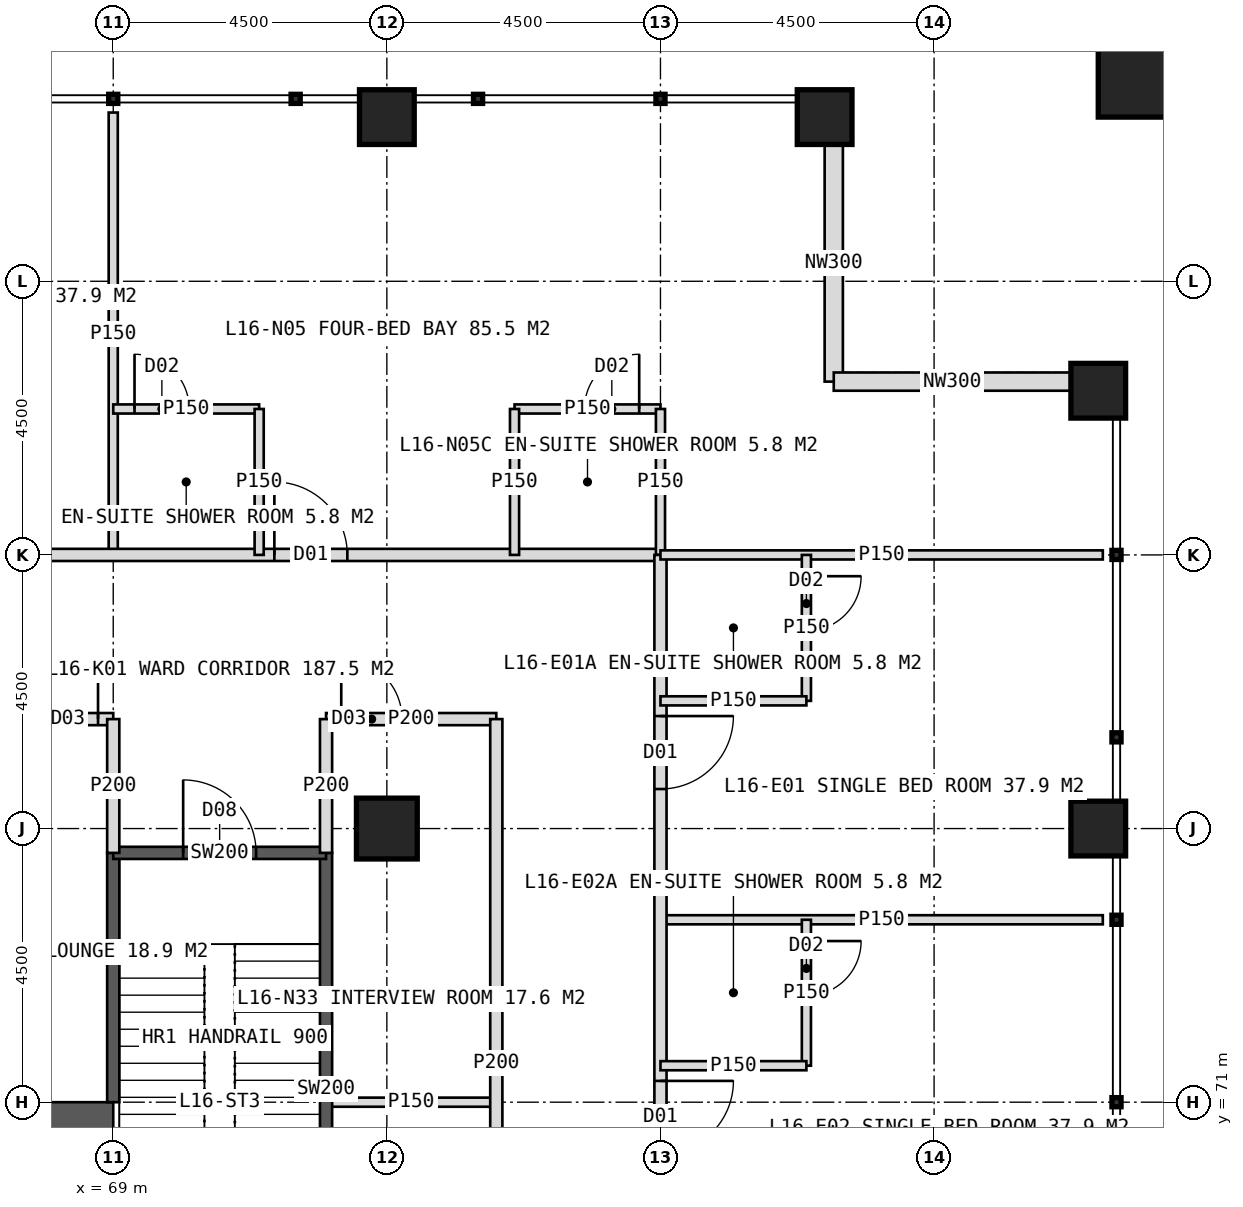
"""IFC4 building model, lengths in metres.
Left out: names, types, materials, properties, quantities, classifications, styles, units other than length and angle.
Written with IfcOpenShell. Run it as: python <this file> out.ifc"""

import sys

from ifc_helpers import new_model, si_unit, direction, frame, frame_2d, origin, origin_2d, place, context, subcontext, project, spatial, rectangle, hollow_rectangle, extrude, element, fill, save


model = new_model("IFC4")
c1 = context("Model", 3, precision=1e-05, world=origin(), true_north=direction((0.0, 1.0)))
c2 = subcontext(c1, "Body", "Model", "MODEL_VIEW")
j1 = project(units=[si_unit("LENGTHUNIT", "METRE"), si_unit("PLANEANGLEUNIT", "RADIAN")], contexts=[c1])
p1 = place(None, origin())
s1 = spatial("IfcSite", under=j1, at=p1, CompositionType="ELEMENT")
p2 = place(p1, origin())
s2 = spatial("IfcBuilding", under=s1, at=p2, CompositionType="ELEMENT")
p3 = place(p2, frame((0.0, 0.0, 71.0)))
s3 = spatial("IfcBuildingStorey", under=s2, at=p3, CompositionType="ELEMENT", Elevation=71.0)
p4 = place(p3, frame((51.0, 70.75, 0.0), z_axis=(0.0, 0.0, 1.0), x_axis=(1.0, 0.0, 0.0)))
e1 = element("IfcWall", 1, at=p4, inside=s3, PredefinedType="SHEAR", context=c2, shape_type="SweptSolid", body=[
    extrude(rectangle(XDim=18.0, YDim=0.5, at=frame_2d((9.0, 0.0))), origin(), (0.0, 0.0, 1.0), 4.0),
])
p5 = place(p4, frame((8.1, 0.0, 0.0)))
e2 = element("IfcOpeningElement", 2, at=p5, cuts=e1, PredefinedType="OPENING", context=c2, shape_type="SweptSolid", body=[
    extrude(rectangle(XDim=1.8, YDim=2.2, at=frame_2d((0.9, 1.1))), frame((0.0, 0.26, 0.0), z_axis=(0.0, -1.0, 0.0), x_axis=(1.0, 0.0, 0.0)), (0.0, 0.0, 1.0), 0.52),
])
p6 = place(p3, frame((73.5, 75.5, 0.0), z_axis=(0.0, 0.0, 1.0), x_axis=(1.0, 0.0, 0.0)))
e3 = element("IfcColumn", 3, at=p6, inside=s3, PredefinedType="COLUMN", context=c2, shape_type="SweptSolid", body=[
    extrude(hollow_rectangle(XDim=1.0, YDim=1.0, WallThickness=0.1, at=origin_2d()), origin(), (0.0, 0.0, 1.0), 4.0),
])
for number, where, z_axis, x_axis in (
    (4, (73.5, 87.2, 0.0), (0.0, 0.0, 1.0), (1.0, 0.0, 0.0)),
    (5, (85.2, 75.5, 0.0), (0.0, 0.0, 1.0), (1.0, 0.0, 0.0)),
    (6, (80.7, 87.2, 0.0), (0.0, 0.0, 1.0), (1.0, 0.0, 0.0)),
    (7, (85.2, 82.7, 0.0), (0.0, 0.0, 1.0), (1.0, 0.0, 0.0)),
):
    element("IfcColumn", number, at=place(p3, frame(where, z_axis=z_axis, x_axis=x_axis)), inside=s3, PredefinedType="COLUMN", context=c2, shape_type="SweptSolid", body=[
        extrude(hollow_rectangle(XDim=0.9, YDim=0.9, WallThickness=0.08, at=origin_2d()), origin(), (0.0, 0.0, 1.0), 4.0),
    ])
p7 = place(p3, frame((86.1, 88.1, 0.0), z_axis=(0.0, 0.0, 1.0), x_axis=(1.0, 0.0, 0.0)))
e8 = element("IfcColumn", 8, at=p7, inside=s3, PredefinedType="COLUMN", context=c2, shape_type="SweptSolid", body=[
    extrude(hollow_rectangle(XDim=1.8, YDim=1.8, WallThickness=0.1, at=origin_2d()), origin(), (0.0, 0.0, 1.0), 4.0),
])
for number, where, z_axis, x_axis in (
    (9, (80.85, 86.75, 0.0), (0.0, 0.0, 1.0), (0.0, -1.0, 0.0)),
    (10, (80.85, 82.85, 0.0), (0.0, 0.0, 1.0), (1.0, 0.0, 0.0)),
):
    element("IfcWall", number, at=place(p3, frame(where, z_axis=z_axis, x_axis=x_axis)), inside=s3, PredefinedType="ELEMENTEDWALL", context=c2, shape_type="SweptSolid", body=[
        extrude(rectangle(XDim=3.9, YDim=0.3, at=frame_2d((1.95, 0.0))), origin(), (0.0, 0.0, 1.0), 2.95),
    ])
p8 = place(p3, frame((69.0, 80.0, 0.0), z_axis=(0.0, 0.0, 1.0), x_axis=(0.0, 1.0, 0.0)))
e11 = element("IfcWall", 11, at=p8, inside=s3, PredefinedType="PARTITIONING", context=c2, shape_type="SweptSolid", body=[
    extrude(rectangle(XDim=7.275, YDim=0.15, at=frame_2d((3.637, 0.0))), origin(), (0.0, 0.0, 1.0), 3.75),
])
p9 = place(p3, frame((42.0, 80.0, 0.0), z_axis=(0.0, 0.0, 1.0), x_axis=(1.0, 0.0, 0.0)))
e12 = element("IfcWall", 12, at=p9, inside=s3, PredefinedType="PARTITIONING", context=c2, shape_type="SweptSolid", body=[
    extrude(rectangle(XDim=36.0, YDim=0.2, at=frame_2d((18.0, 0.0))), origin(), (0.0, 0.0, 1.0), 3.75),
])
p10 = place(p9, frame((3.9, 0.0, 0.0)))
e13 = element("IfcOpeningElement", 13, at=p10, cuts=e12, PredefinedType="OPENING", context=c2, shape_type="SweptSolid", body=[
    extrude(rectangle(XDim=1.2, YDim=2.2, at=frame_2d((0.6, 1.1))), frame((0.0, 0.11, 0.0), z_axis=(0.0, -1.0, 0.0), x_axis=(1.0, 0.0, 0.0)), (0.0, 0.0, 1.0), 0.22),
])
p11 = place(p9, frame((11.65, 0.0, 0.0)))
e14 = element("IfcOpeningElement", 14, at=p11, cuts=e12, PredefinedType="OPENING", context=c2, shape_type="SweptSolid", body=[
    extrude(rectangle(XDim=1.2, YDim=2.2, at=frame_2d((0.6, 1.1))), frame((0.0, 0.11, 0.0), z_axis=(0.0, -1.0, 0.0), x_axis=(1.0, 0.0, 0.0)), (0.0, 0.0, 1.0), 0.22),
])
p12 = place(p9, frame((17.65, 0.0, 0.0)))
e15 = element("IfcOpeningElement", 15, at=p12, cuts=e12, PredefinedType="OPENING", context=c2, shape_type="SweptSolid", body=[
    extrude(rectangle(XDim=1.2, YDim=2.2, at=frame_2d((0.6, 1.1))), frame((0.0, 0.11, 0.0), z_axis=(0.0, -1.0, 0.0), x_axis=(1.0, 0.0, 0.0)), (0.0, 0.0, 1.0), 0.22),
])
p13 = place(p9, frame((23.65, 0.0, 0.0)))
e16 = element("IfcOpeningElement", 16, at=p13, cuts=e12, PredefinedType="OPENING", context=c2, shape_type="SweptSolid", body=[
    extrude(rectangle(XDim=1.2, YDim=2.2, at=frame_2d((0.6, 1.1))), frame((0.0, 0.11, 0.0), z_axis=(0.0, -1.0, 0.0), x_axis=(1.0, 0.0, 0.0)), (0.0, 0.0, 1.0), 0.22),
])
p14 = place(p9, frame((29.65, 0.0, 0.0)))
e17 = element("IfcOpeningElement", 17, at=p14, cuts=e12, PredefinedType="OPENING", context=c2, shape_type="SweptSolid", body=[
    extrude(rectangle(XDim=1.2, YDim=2.2, at=frame_2d((0.6, 1.1))), frame((0.0, 0.11, 0.0), z_axis=(0.0, -1.0, 0.0), x_axis=(1.0, 0.0, 0.0)), (0.0, 0.0, 1.0), 0.22),
])
p15 = place(p3, frame((69.0, 82.4, 0.0), z_axis=(0.0, 0.0, 1.0), x_axis=(1.0, 0.0, 0.0)))
e18 = element("IfcWall", 18, at=p15, inside=s3, PredefinedType="PARTITIONING", context=c2, shape_type="SweptSolid", body=[
    extrude(rectangle(XDim=2.4, YDim=0.15, at=frame_2d((1.2, 0.0))), origin(), (0.0, 0.0, 1.0), 3.75),
])
p16 = place(p15, frame((0.35, 0.0, 0.0)))
e19 = element("IfcOpeningElement", 19, at=p16, cuts=e18, PredefinedType="OPENING", context=c2, shape_type="SweptSolid", body=[
    extrude(rectangle(XDim=0.9, YDim=2.1, at=frame_2d((0.45, 1.05))), frame((0.0, 0.085, 0.0), z_axis=(0.0, -1.0, 0.0), x_axis=(1.0, 0.0, 0.0)), (0.0, 0.0, 1.0), 0.17),
])
p17 = place(p3, frame((71.4, 80.0, 0.0), z_axis=(0.0, 0.0, 1.0), x_axis=(0.0, 1.0, 0.0)))
e20 = element("IfcWall", 20, at=p17, inside=s3, PredefinedType="PARTITIONING", context=c2, shape_type="SweptSolid", body=[
    extrude(rectangle(XDim=2.4, YDim=0.15, at=frame_2d((1.2, 0.0))), origin(), (0.0, 0.0, 1.0), 3.75),
])
p18 = place(p3, frame((75.6, 82.4, 0.0), z_axis=(0.0, 0.0, 1.0), x_axis=(1.0, 0.0, 0.0)))
e21 = element("IfcWall", 21, at=p18, inside=s3, PredefinedType="PARTITIONING", context=c2, shape_type="SweptSolid", body=[
    extrude(rectangle(XDim=2.4, YDim=0.15, at=frame_2d((1.2, 0.0))), origin(), (0.0, 0.0, 1.0), 3.75),
])
p19 = place(p18, frame((1.15, 0.0, 0.0)))
e22 = element("IfcOpeningElement", 22, at=p19, cuts=e21, PredefinedType="OPENING", context=c2, shape_type="SweptSolid", body=[
    extrude(rectangle(XDim=0.9, YDim=2.1, at=frame_2d((0.45, 1.05))), frame((0.0, 0.085, 0.0), z_axis=(0.0, -1.0, 0.0), x_axis=(1.0, 0.0, 0.0)), (0.0, 0.0, 1.0), 0.17),
])
for number, where, z_axis, x_axis in (
    (23, (75.6, 80.0, 0.0), (0.0, 0.0, 1.0), (0.0, 1.0, 0.0)),
    (24, (78.0, 80.0, 0.0), (0.0, 0.0, 1.0), (0.0, 1.0, 0.0)),
):
    element("IfcWall", number, at=place(p3, frame(where, z_axis=z_axis, x_axis=x_axis)), inside=s3, PredefinedType="PARTITIONING", context=c2, shape_type="SweptSolid", body=[
        extrude(rectangle(XDim=2.4, YDim=0.15, at=frame_2d((1.2, 0.0))), origin(), (0.0, 0.0, 1.0), 3.75),
    ])
p20 = place(p3, frame((62.25, 77.3, 0.0), z_axis=(0.0, 0.0, 1.0), x_axis=(1.0, 0.0, 0.0)))
e25 = element("IfcWall", 25, at=p20, inside=s3, PredefinedType="PARTITIONING", context=c2, shape_type="SweptSolid", body=[
    extrude(rectangle(XDim=6.75, YDim=0.2, at=frame_2d((3.375, 0.0))), origin(), (0.0, 0.0, 1.0), 3.75),
])
p21 = place(p20, frame((1.375, 0.0, 0.0)))
e26 = element("IfcOpeningElement", 26, at=p21, cuts=e25, PredefinedType="OPENING", context=c2, shape_type="SweptSolid", body=[
    extrude(rectangle(XDim=1.0, YDim=2.1, at=frame_2d((0.5, 1.05))), frame((0.0, 0.11, 0.0), z_axis=(0.0, -1.0, 0.0), x_axis=(1.0, 0.0, 0.0)), (0.0, 0.0, 1.0), 0.22),
])
p22 = place(p20, frame((5.5, 0.0, 0.0)))
e27 = element("IfcOpeningElement", 27, at=p22, cuts=e25, PredefinedType="OPENING", context=c2, shape_type="SweptSolid", body=[
    extrude(rectangle(XDim=1.0, YDim=2.1, at=frame_2d((0.5, 1.05))), frame((0.0, 0.11, 0.0), z_axis=(0.0, -1.0, 0.0), x_axis=(1.0, 0.0, 0.0)), (0.0, 0.0, 1.0), 0.22),
])
p23 = place(p3, frame((72.5, 77.3, 0.0), z_axis=(0.0, 0.0, 1.0), x_axis=(1.0, 0.0, 0.0)))
e28 = element("IfcWall", 28, at=p23, inside=s3, PredefinedType="PARTITIONING", context=c2, shape_type="SweptSolid", body=[
    extrude(rectangle(XDim=2.8, YDim=0.2, at=frame_2d((1.4, 0.0))), origin(), (0.0, 0.0, 1.0), 3.75),
])
p24 = place(p23, frame((0.25, 0.0, 0.0)))
e29 = element("IfcOpeningElement", 29, at=p24, cuts=e28, PredefinedType="OPENING", context=c2, shape_type="SweptSolid", body=[
    extrude(rectangle(XDim=1.0, YDim=2.1, at=frame_2d((0.5, 1.05))), frame((0.0, 0.11, 0.0), z_axis=(0.0, -1.0, 0.0), x_axis=(1.0, 0.0, 0.0)), (0.0, 0.0, 1.0), 0.22),
])
p25 = place(p3, frame((78.0, 74.0, 0.0), z_axis=(0.0, 0.0, 1.0), x_axis=(1.0, 0.0, 0.0)))
e30 = element("IfcWall", 30, at=p25, inside=s3, PredefinedType="PARTITIONING", context=c2, shape_type="SweptSolid", body=[
    extrude(rectangle(XDim=7.275, YDim=0.15, at=frame_2d((3.637, 0.0))), origin(), (0.0, 0.0, 1.0), 3.75),
])
p26 = place(p3, frame((78.0, 80.0, 0.0), z_axis=(0.0, 0.0, 1.0), x_axis=(0.0, -1.0, 0.0)))
e31 = element("IfcWall", 31, at=p26, inside=s3, PredefinedType="PARTITIONING", context=c2, shape_type="SweptSolid", body=[
    extrude(rectangle(XDim=36.0, YDim=0.2, at=frame_2d((18.0, 0.0))), origin(), (0.0, 0.0, 1.0), 3.75),
])
p27 = place(p26, frame((2.65, 0.0, 0.0)))
e32 = element("IfcOpeningElement", 32, at=p27, cuts=e31, PredefinedType="OPENING", context=c2, shape_type="SweptSolid", body=[
    extrude(rectangle(XDim=1.2, YDim=2.2, at=frame_2d((0.6, 1.1))), frame((0.0, 0.11, 0.0), z_axis=(0.0, -1.0, 0.0), x_axis=(1.0, 0.0, 0.0)), (0.0, 0.0, 1.0), 0.22),
])
p28 = place(p26, frame((8.65, 0.0, 0.0)))
e33 = element("IfcOpeningElement", 33, at=p28, cuts=e31, PredefinedType="OPENING", context=c2, shape_type="SweptSolid", body=[
    extrude(rectangle(XDim=1.2, YDim=2.2, at=frame_2d((0.6, 1.1))), frame((0.0, 0.11, 0.0), z_axis=(0.0, -1.0, 0.0), x_axis=(1.0, 0.0, 0.0)), (0.0, 0.0, 1.0), 0.22),
])
p29 = place(p26, frame((14.65, 0.0, 0.0)))
e34 = element("IfcOpeningElement", 34, at=p29, cuts=e31, PredefinedType="OPENING", context=c2, shape_type="SweptSolid", body=[
    extrude(rectangle(XDim=1.2, YDim=2.2, at=frame_2d((0.6, 1.1))), frame((0.0, 0.11, 0.0), z_axis=(0.0, -1.0, 0.0), x_axis=(1.0, 0.0, 0.0)), (0.0, 0.0, 1.0), 0.22),
])
p30 = place(p26, frame((21.25, 0.0, 0.0)))
e35 = element("IfcOpeningElement", 35, at=p30, cuts=e31, PredefinedType="OPENING", context=c2, shape_type="SweptSolid", body=[
    extrude(rectangle(XDim=1.2, YDim=2.2, at=frame_2d((0.6, 1.1))), frame((0.0, 0.11, 0.0), z_axis=(0.0, -1.0, 0.0), x_axis=(1.0, 0.0, 0.0)), (0.0, 0.0, 1.0), 0.22),
])
p31 = place(p26, frame((29.65, 0.0, 0.0)))
e36 = element("IfcOpeningElement", 36, at=p31, cuts=e31, PredefinedType="OPENING", context=c2, shape_type="SweptSolid", body=[
    extrude(rectangle(XDim=1.2, YDim=2.2, at=frame_2d((0.6, 1.1))), frame((0.0, 0.11, 0.0), z_axis=(0.0, -1.0, 0.0), x_axis=(1.0, 0.0, 0.0)), (0.0, 0.0, 1.0), 0.22),
])
p32 = place(p3, frame((78.0, 80.0, 0.0), z_axis=(0.0, 0.0, 1.0), x_axis=(1.0, 0.0, 0.0)))
e37 = element("IfcWall", 37, at=p32, inside=s3, PredefinedType="PARTITIONING", context=c2, shape_type="SweptSolid", body=[
    extrude(rectangle(XDim=7.275, YDim=0.15, at=frame_2d((3.637, 0.0))), origin(), (0.0, 0.0, 1.0), 3.75),
])
p33 = place(p3, frame((80.4, 80.0, 0.0), z_axis=(0.0, 0.0, 1.0), x_axis=(0.0, -1.0, 0.0)))
e38 = element("IfcWall", 38, at=p33, inside=s3, PredefinedType="PARTITIONING", context=c2, shape_type="SweptSolid", body=[
    extrude(rectangle(XDim=2.4, YDim=0.15, at=frame_2d((1.2, 0.0))), origin(), (0.0, 0.0, 1.0), 3.75),
])
p34 = place(p33, frame((0.35, 0.0, 0.0)))
e39 = element("IfcOpeningElement", 39, at=p34, cuts=e38, PredefinedType="OPENING", context=c2, shape_type="SweptSolid", body=[
    extrude(rectangle(XDim=0.9, YDim=2.1, at=frame_2d((0.45, 1.05))), frame((0.0, 0.085, 0.0), z_axis=(0.0, -1.0, 0.0), x_axis=(1.0, 0.0, 0.0)), (0.0, 0.0, 1.0), 0.17),
])
p35 = place(p3, frame((78.0, 77.6, 0.0), z_axis=(0.0, 0.0, 1.0), x_axis=(1.0, 0.0, 0.0)))
e40 = element("IfcWall", 40, at=p35, inside=s3, PredefinedType="PARTITIONING", context=c2, shape_type="SweptSolid", body=[
    extrude(rectangle(XDim=2.4, YDim=0.15, at=frame_2d((1.2, 0.0))), origin(), (0.0, 0.0, 1.0), 3.75),
])
p36 = place(p3, frame((80.4, 74.0, 0.0), z_axis=(0.0, 0.0, 1.0), x_axis=(0.0, -1.0, 0.0)))
e41 = element("IfcWall", 41, at=p36, inside=s3, PredefinedType="PARTITIONING", context=c2, shape_type="SweptSolid", body=[
    extrude(rectangle(XDim=2.4, YDim=0.15, at=frame_2d((1.2, 0.0))), origin(), (0.0, 0.0, 1.0), 3.75),
])
p37 = place(p36, frame((0.35, 0.0, 0.0)))
e42 = element("IfcOpeningElement", 42, at=p37, cuts=e41, PredefinedType="OPENING", context=c2, shape_type="SweptSolid", body=[
    extrude(rectangle(XDim=0.9, YDim=2.1, at=frame_2d((0.45, 1.05))), frame((0.0, 0.085, 0.0), z_axis=(0.0, -1.0, 0.0), x_axis=(1.0, 0.0, 0.0)), (0.0, 0.0, 1.0), 0.17),
])
p38 = place(p3, frame((78.0, 71.6, 0.0), z_axis=(0.0, 0.0, 1.0), x_axis=(1.0, 0.0, 0.0)))
e43 = element("IfcWall", 43, at=p38, inside=s3, PredefinedType="PARTITIONING", context=c2, shape_type="SweptSolid", body=[
    extrude(rectangle(XDim=2.4, YDim=0.15, at=frame_2d((1.2, 0.0))), origin(), (0.0, 0.0, 1.0), 3.75),
])
p39 = place(p3, frame((72.5, 71.0, 0.0), z_axis=(0.0, 0.0, 1.0), x_axis=(1.0, 0.0, 0.0)))
e44 = element("IfcWall", 44, at=p39, inside=s3, PredefinedType="PARTITIONING", context=c2, shape_type="SweptSolid", body=[
    extrude(rectangle(XDim=2.8, YDim=0.15, at=frame_2d((1.4, 0.0))), origin(), (0.0, 0.0, 1.0), 3.75),
])
p40 = place(p3, frame((75.3, 77.3, 0.0), z_axis=(0.0, 0.0, 1.0), x_axis=(0.0, -1.0, 0.0)))
e45 = element("IfcWall", 45, at=p40, inside=s3, PredefinedType="PARTITIONING", context=c2, shape_type="SweptSolid", body=[
    extrude(rectangle(XDim=11.3, YDim=0.2, at=frame_2d((5.65, 0.0))), origin(), (0.0, 0.0, 1.0), 3.75),
])
p41 = place(p40, frame((8.3, 0.0, 0.0)))
e46 = element("IfcOpeningElement", 46, at=p41, cuts=e45, PredefinedType="OPENING", context=c2, shape_type="SweptSolid", body=[
    extrude(rectangle(XDim=1.0, YDim=2.1, at=frame_2d((0.5, 1.05))), frame((0.0, 0.11, 0.0), z_axis=(0.0, -1.0, 0.0), x_axis=(1.0, 0.0, 0.0)), (0.0, 0.0, 1.0), 0.22),
])
p42 = place(p3, frame((69.0, 71.0, 0.0), z_axis=(0.0, 0.0, 1.0), x_axis=(0.0, 1.0, 0.0)))
e47 = element("IfcWall", 47, at=p42, inside=s3, PredefinedType="SOLIDWALL", context=c2, shape_type="SweptSolid", body=[
    extrude(rectangle(XDim=4.1, YDim=0.2, at=frame_2d((2.05, 0.0))), origin(), (0.0, 0.0, 1.0), 3.75),
])
p43 = place(p3, frame((72.5, 67.35, 0.0), z_axis=(0.0, 0.0, 1.0), x_axis=(0.0, 1.0, 0.0)))
e48 = element("IfcWall", 48, at=p43, inside=s3, PredefinedType="SOLIDWALL", context=c2, shape_type="SweptSolid", body=[
    extrude(rectangle(XDim=7.75, YDim=0.2, at=frame_2d((3.875, 0.0))), origin(), (0.0, 0.0, 1.0), 3.75),
])
p44 = place(p3, frame((69.0, 75.1, 0.0), z_axis=(0.0, 0.0, 1.0), x_axis=(1.0, 0.0, 0.0)))
e49 = element("IfcWall", 49, at=p44, inside=s3, PredefinedType="SOLIDWALL", context=c2, shape_type="SweptSolid", body=[
    extrude(rectangle(XDim=3.5, YDim=0.2, at=frame_2d((1.75, 0.0))), origin(), (0.0, 0.0, 1.0), 3.75),
])
p45 = place(p44, frame((1.15, 0.0, 0.0)))
e50 = element("IfcOpeningElement", 50, at=p45, cuts=e49, PredefinedType="OPENING", context=c2, shape_type="SweptSolid", body=[
    extrude(rectangle(XDim=1.2, YDim=2.1, at=frame_2d((0.6, 1.05))), frame((0.0, 0.11, 0.0), z_axis=(0.0, -1.0, 0.0), x_axis=(1.0, 0.0, 0.0)), (0.0, 0.0, 1.0), 0.22),
])
for number, where, z_axis, x_axis in (
    (51, (69.0, 75.1, 0.0), (0.0, 0.0, 1.0), (0.0, 1.0, 0.0)),
    (52, (72.5, 75.1, 0.0), (0.0, 0.0, 1.0), (0.0, 1.0, 0.0)),
):
    element("IfcWall", number, at=place(p3, frame(where, z_axis=z_axis, x_axis=x_axis)), inside=s3, PredefinedType="PARTITIONING", context=c2, shape_type="SweptSolid", body=[
        extrude(rectangle(XDim=2.2, YDim=0.2, at=frame_2d((1.1, 0.0))), origin(), (0.0, 0.0, 1.0), 3.75),
    ])
p46 = place(p14, origin())
e53 = element("IfcDoor", 53, at=p46, inside=s3, OperationType="SINGLE_SWING_LEFT", PredefinedType="DOOR", context=c2, shape_type="SweptSolid", body=[
    extrude(rectangle(XDim=1.2, YDim=2.2, at=frame_2d((0.6, 1.1))), frame((0.0, 0.025, 0.0), z_axis=(0.0, -1.0, 0.0), x_axis=(1.0, 0.0, 0.0)), (0.0, 0.0, 1.0), 0.05),
])
fill(e17, e53)
p47 = place(p16, origin())
e54 = element("IfcDoor", 54, at=p47, inside=s3, OperationType="SINGLE_SWING_LEFT", PredefinedType="DOOR", context=c2, shape_type="SweptSolid", body=[
    extrude(rectangle(XDim=0.9, YDim=2.1, at=frame_2d((0.45, 1.05))), frame((0.0, 0.025, 0.0), z_axis=(0.0, -1.0, 0.0), x_axis=(1.0, 0.0, 0.0)), (0.0, 0.0, 1.0), 0.05),
])
fill(e19, e54)
p48 = place(p19, origin())
e55 = element("IfcDoor", 55, at=p48, inside=s3, OperationType="SINGLE_SWING_RIGHT", PredefinedType="DOOR", context=c2, shape_type="SweptSolid", body=[
    extrude(rectangle(XDim=0.9, YDim=2.1, at=frame_2d((0.45, 1.05))), frame((0.0, 0.025, 0.0), z_axis=(0.0, -1.0, 0.0), x_axis=(1.0, 0.0, 0.0)), (0.0, 0.0, 1.0), 0.05),
])
fill(e22, e55)
p49 = place(p22, origin())
e56 = element("IfcDoor", 56, at=p49, inside=s3, OperationType="SINGLE_SWING_RIGHT", PredefinedType="DOOR", context=c2, shape_type="SweptSolid", body=[
    extrude(rectangle(XDim=1.0, YDim=2.1, at=frame_2d((0.5, 1.05))), frame((0.0, 0.025, 0.0), z_axis=(0.0, -1.0, 0.0), x_axis=(1.0, 0.0, 0.0)), (0.0, 0.0, 1.0), 0.05),
])
fill(e27, e56)
p50 = place(p24, origin())
e57 = element("IfcDoor", 57, at=p50, inside=s3, OperationType="SINGLE_SWING_LEFT", PredefinedType="DOOR", context=c2, shape_type="SweptSolid", body=[
    extrude(rectangle(XDim=1.0, YDim=2.1, at=frame_2d((0.5, 1.05))), frame((0.0, 0.025, 0.0), z_axis=(0.0, -1.0, 0.0), x_axis=(1.0, 0.0, 0.0)), (0.0, 0.0, 1.0), 0.05),
])
fill(e29, e57)
p51 = place(p27, origin())
e58 = element("IfcDoor", 58, at=p51, inside=s3, OperationType="SINGLE_SWING_LEFT", PredefinedType="DOOR", context=c2, shape_type="SweptSolid", body=[
    extrude(rectangle(XDim=1.2, YDim=2.2, at=frame_2d((0.6, 1.1))), frame((0.0, 0.025, 0.0), z_axis=(0.0, -1.0, 0.0), x_axis=(1.0, 0.0, 0.0)), (0.0, 0.0, 1.0), 0.05),
])
fill(e32, e58)
p52 = place(p34, origin())
e59 = element("IfcDoor", 59, at=p52, inside=s3, OperationType="SINGLE_SWING_LEFT", PredefinedType="DOOR", context=c2, shape_type="SweptSolid", body=[
    extrude(rectangle(XDim=0.9, YDim=2.1, at=frame_2d((0.45, 1.05))), frame((0.0, 0.025, 0.0), z_axis=(0.0, -1.0, 0.0), x_axis=(1.0, 0.0, 0.0)), (0.0, 0.0, 1.0), 0.05),
])
fill(e39, e59)
p53 = place(p28, origin())
e60 = element("IfcDoor", 60, at=p53, inside=s3, OperationType="SINGLE_SWING_LEFT", PredefinedType="DOOR", context=c2, shape_type="SweptSolid", body=[
    extrude(rectangle(XDim=1.2, YDim=2.2, at=frame_2d((0.6, 1.1))), frame((0.0, 0.025, 0.0), z_axis=(0.0, -1.0, 0.0), x_axis=(1.0, 0.0, 0.0)), (0.0, 0.0, 1.0), 0.05),
])
fill(e33, e60)
p54 = place(p37, origin())
e61 = element("IfcDoor", 61, at=p54, inside=s3, OperationType="SINGLE_SWING_LEFT", PredefinedType="DOOR", context=c2, shape_type="SweptSolid", body=[
    extrude(rectangle(XDim=0.9, YDim=2.1, at=frame_2d((0.45, 1.05))), frame((0.0, 0.025, 0.0), z_axis=(0.0, -1.0, 0.0), x_axis=(1.0, 0.0, 0.0)), (0.0, 0.0, 1.0), 0.05),
])
fill(e42, e61)
p55 = place(p45, origin())
e62 = element("IfcDoor", 62, at=p55, inside=s3, OperationType="SINGLE_SWING_LEFT", PredefinedType="DOOR", context=c2, shape_type="SweptSolid", body=[
    extrude(rectangle(XDim=1.2, YDim=2.1, at=frame_2d((0.6, 1.05))), frame((0.0, 0.025, 0.0), z_axis=(0.0, -1.0, 0.0), x_axis=(1.0, 0.0, 0.0)), (0.0, 0.0, 1.0), 0.05),
])
fill(e50, e62)
save(model, sys.argv[1])
